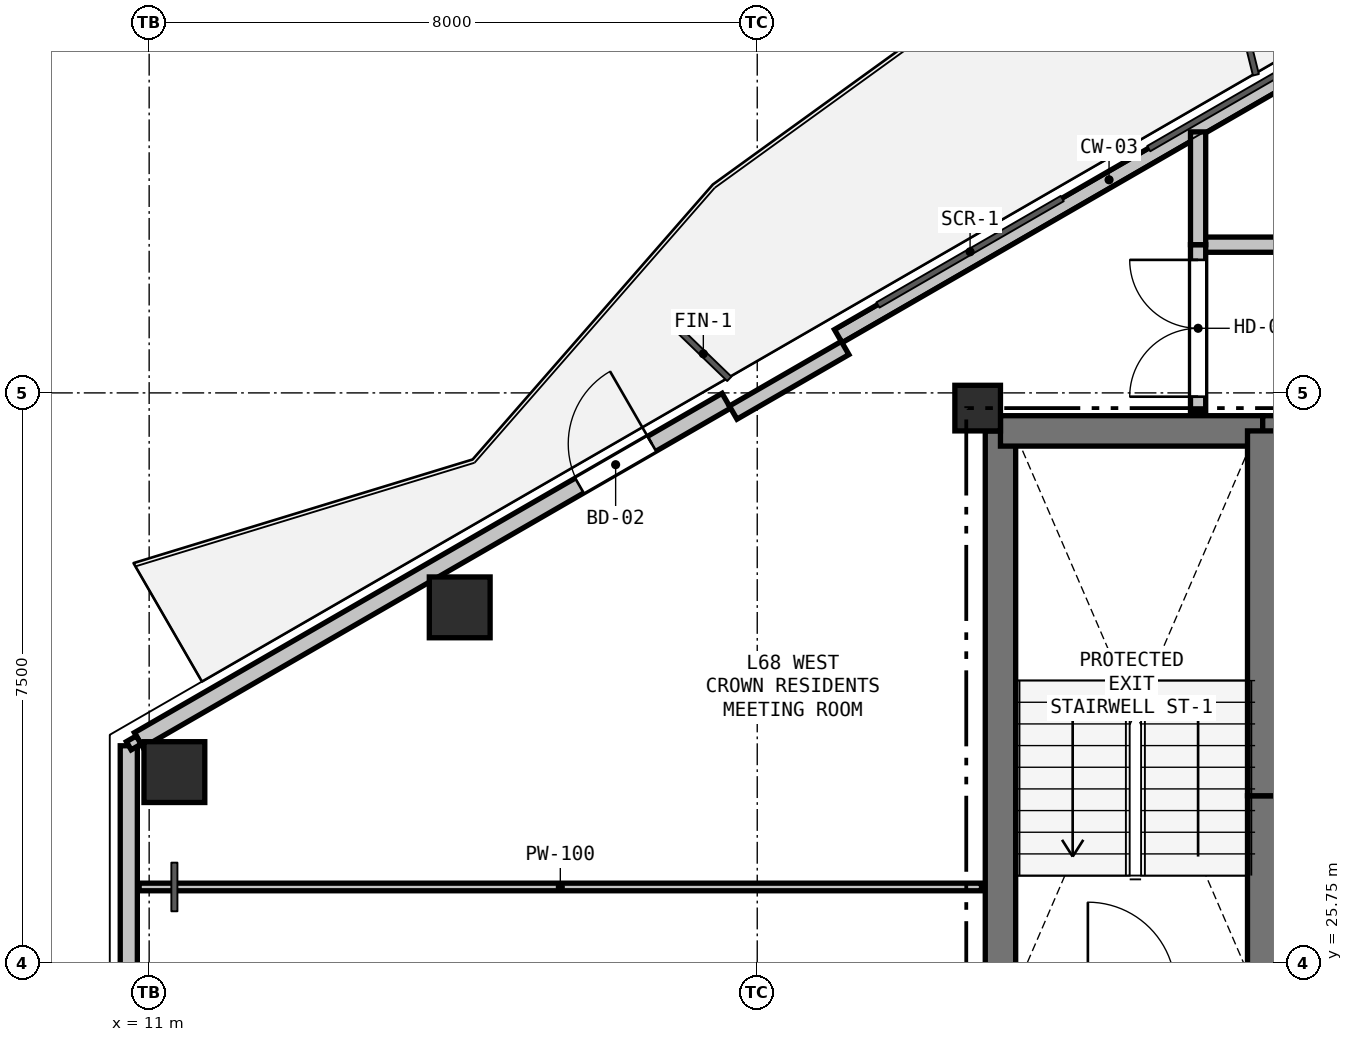
"""IFC4 building model, lengths in metres.
Left out: names, types, materials, properties, quantities, classifications, styles, units other than length and angle.
Written with IfcOpenShell. Run it as: python <this file> out.ifc"""

import sys

from ifc_helpers import new_model, si_unit, direction, frame, frame_2d, origin, origin_2d, place, context, subcontext, project, spatial, rectangle, hollow_rectangle, extrude, element, fill, save


model = new_model("IFC4")
c1 = context("Model", 3, precision=1e-05, world=origin(), true_north=direction((0.0, 1.0)))
c2 = subcontext(c1, "Body", "Model", "MODEL_VIEW")
j1 = project(units=[si_unit("LENGTHUNIT", "METRE"), si_unit("PLANEANGLEUNIT", "RADIAN")], contexts=[c1])
p1 = place(None, origin())
s1 = spatial("IfcSite", under=j1, at=p1, CompositionType="ELEMENT")
p2 = place(p1, origin())
s2 = spatial("IfcBuilding", under=s1, at=p2, CompositionType="ELEMENT")
p3 = place(p2, frame((0.0, 0.0, 243.0)))
s3 = spatial("IfcBuildingStorey", under=s2, at=p3, CompositionType="ELEMENT", Elevation=243.0)
p4 = place(p3, frame((21.9, 33.05, 0.0), z_axis=(0.0, 0.0, 1.0), x_axis=(1.0, 0.0, 0.0)))
e1 = element("IfcColumn", 1, at=p4, inside=s3, PredefinedType="COLUMN", context=c2, shape_type="SweptSolid", body=[
    extrude(rectangle(XDim=0.6, YDim=0.6, at=origin_2d()), origin(), (0.0, 0.0, 1.0), 3.3),
])
for number, where, z_axis, x_axis in (
    (2, (11.332, 28.261, 0.0), (0.0, 0.0, 1.0), (1.0, 0.0, 0.0)),
    (3, (15.086, 30.428, 0.0), (0.0, 0.0, 1.0), (1.0, 0.0, 0.0)),
):
    element("IfcColumn", number, at=place(p3, frame(where, z_axis=z_axis, x_axis=x_axis)), inside=s3, PredefinedType="COLUMN", context=c2, shape_type="SweptSolid", body=[
        extrude(hollow_rectangle(XDim=0.8, YDim=0.8, WallThickness=0.025, at=origin_2d()), origin(), (0.0, 0.0, 1.0), 3.3),
    ])
p5 = place(p3, frame((10.732, 24.892, 0.0), z_axis=(0.0, 0.0, 1.0), x_axis=(0.0, 1.0, 0.0)))
e4 = element("IfcWall", 4, at=p5, inside=s3, PredefinedType="SOLIDWALL", context=c2, shape_type="SweptSolid", body=[
    extrude(rectangle(XDim=3.715, YDim=0.225, at=frame_2d((1.858, 0.0))), origin(), (0.0, 0.0, 1.0), 2.7),
])
p6 = place(p3, frame((10.862, 28.683, 0.0), z_axis=(0.0, 0.0, 1.0), x_axis=(0.866026655105, 0.499997832642, 0.0)))
e5 = element("IfcWall", 5, at=p6, inside=s3, PredefinedType="SOLIDWALL", context=c2, shape_type="SweptSolid", body=[
    extrude(rectangle(XDim=8.928, YDim=0.225, at=frame_2d((4.464, 0.0))), origin(), (0.0, 0.0, 1.0), 2.7),
])
p7 = place(p6, frame((6.696, 0.0, 0.0)))
e6 = element("IfcOpeningElement", 6, at=p7, cuts=e5, PredefinedType="OPENING", context=c2, shape_type="SweptSolid", body=[
    extrude(rectangle(XDim=1.1, YDim=2.1, at=frame_2d((0.55, 1.05))), frame((0.0, 0.123, 0.0), z_axis=(0.0, -1.0, 0.0), x_axis=(1.0, 0.0, 0.0)), (0.0, 0.0, 1.0), 0.245),
])
p8 = place(p3, frame((20.066, 33.997, 0.0), z_axis=(0.0, 0.0, 1.0), x_axis=(0.866019557082, 0.500010126649, 0.0)))
e7 = element("IfcWall", 7, at=p8, inside=s3, PredefinedType="PARAPET", context=c2, shape_type="SweptSolid", body=[
    extrude(rectangle(XDim=8.228, YDim=0.2, at=frame_2d((4.114, 0.0))), origin(), (0.0, 0.0, 1.0), 0.2),
])
p9 = place(p3, frame((18.684, 32.991, 0.0), z_axis=(0.0, 0.0, 1.0), x_axis=(0.866025371046, 0.500000056704, 0.0)))
e8 = element("IfcWall", 8, at=p9, inside=s3, PredefinedType="PARAPET", context=c2, shape_type="SweptSolid", body=[
    extrude(rectangle(XDim=1.7, YDim=0.2, at=frame_2d((0.85, 0.0))), origin(), (0.0, 0.0, 1.0), 2.7),
])
p10 = place(p3, frame((22.2, 25.4, 0.0), z_axis=(0.0, 0.0, 1.0), x_axis=(0.0, 1.0, 0.0)))
e9 = element("IfcWall", 9, at=p10, inside=s3, PredefinedType="SHEAR", context=c2, shape_type="SweptSolid", body=[
    extrude(rectangle(XDim=7.35, YDim=0.4, at=frame_2d((3.675, 0.0))), origin(), (0.0, 0.0, 1.0), 3.08),
])
p11 = place(p3, frame((22.2, 32.75, 0.0), z_axis=(0.0, 0.0, 1.0), x_axis=(1.0, 0.0, 0.0)))
e10 = element("IfcWall", 10, at=p11, inside=s3, PredefinedType="SHEAR", context=c2, shape_type="SweptSolid", body=[
    extrude(rectangle(XDim=3.45, YDim=0.4, at=frame_2d((1.725, 0.0))), origin(), (0.0, 0.0, 1.0), 3.08),
])
p12 = place(p3, frame((25.65, 32.75, 0.0), z_axis=(0.0, 0.0, 1.0), x_axis=(1.0, 0.0, 0.0)))
e11 = element("IfcWall", 11, at=p12, inside=s3, PredefinedType="SHEAR", context=c2, shape_type="SweptSolid", body=[
    extrude(rectangle(XDim=1.75, YDim=0.4, at=frame_2d((0.875, 0.0))), origin(), (0.0, 0.0, 1.0), 3.08),
])
p13 = place(p12, frame((0.375, 0.0, 0.0)))
e12 = element("IfcOpeningElement", 12, at=p13, cuts=e11, PredefinedType="OPENING", context=c2, shape_type="SweptSolid", body=[
    extrude(rectangle(XDim=1.0, YDim=2.15, at=frame_2d((0.5, 1.075))), frame((0.0, 0.21, 0.0), z_axis=(0.0, -1.0, 0.0), x_axis=(1.0, 0.0, 0.0)), (0.0, 0.0, 1.0), 0.42),
])
p14 = place(p3, frame((25.65, 25.55, 0.0), z_axis=(0.0, 0.0, 1.0), x_axis=(0.0, 1.0, 0.0)))
e13 = element("IfcWall", 13, at=p14, inside=s3, PredefinedType="SHEAR", context=c2, shape_type="SweptSolid", body=[
    extrude(rectangle(XDim=2.4, YDim=0.4, at=frame_2d((1.2, 0.0))), origin(), (0.0, 0.0, 1.0), 3.08),
])
p15 = place(p3, frame((25.65, 27.95, 0.0), z_axis=(0.0, 0.0, 1.0), x_axis=(0.0, 1.0, 0.0)))
e14 = element("IfcWall", 14, at=p15, inside=s3, PredefinedType="SHEAR", context=c2, shape_type="SweptSolid", body=[
    extrude(rectangle(XDim=4.8, YDim=0.4, at=frame_2d((2.4, 0.0))), origin(), (0.0, 0.0, 1.0), 3.08),
])
p16 = place(p3, frame((24.8, 35.2, 0.0), z_axis=(0.0, 0.0, 1.0), x_axis=(1.0, 0.0, 0.0)))
e15 = element("IfcWall", 15, at=p16, inside=s3, PredefinedType="PARTITIONING", context=c2, shape_type="SweptSolid", body=[
    extrude(rectangle(XDim=2.0, YDim=0.2, at=frame_2d((1.0, 0.0))), origin(), (0.0, 0.0, 1.0), 3.08),
])
p17 = place(p3, frame((24.8, 33.0, 0.0), z_axis=(0.0, 0.0, 1.0), x_axis=(0.0, 1.0, 0.0)))
e16 = element("IfcWall", 16, at=p17, inside=s3, PredefinedType="PARTITIONING", context=c2, shape_type="SweptSolid", body=[
    extrude(rectangle(XDim=2.2, YDim=0.2, at=frame_2d((1.1, 0.0))), origin(), (0.0, 0.0, 1.0), 2.605),
])
p18 = place(p17, frame((0.2, 0.0, 0.0)))
e17 = element("IfcOpeningElement", 17, at=p18, cuts=e16, PredefinedType="OPENING", context=c2, shape_type="SweptSolid", body=[
    extrude(rectangle(XDim=1.8, YDim=2.2, at=frame_2d((0.9, 1.1))), frame((0.0, 0.11, 0.0), z_axis=(0.0, -1.0, 0.0), x_axis=(1.0, 0.0, 0.0)), (0.0, 0.0, 1.0), 0.22),
])
p19 = place(p3, frame((24.8, 35.2, 0.0), z_axis=(0.0, 0.0, 1.0), x_axis=(0.0, 1.0, 0.0)))
e18 = element("IfcWall", 18, at=p19, inside=s3, PredefinedType="PARTITIONING", context=c2, shape_type="SweptSolid", body=[
    extrude(rectangle(XDim=1.484, YDim=0.2, at=frame_2d((0.742, 0.0))), origin(), (0.0, 0.0, 1.0), 2.365),
])
p20 = place(p3, frame((21.95, 26.75, 0.0), z_axis=(0.0, 0.0, 1.0), x_axis=(-1.0, 0.0, 0.0)))
e19 = element("IfcWall", 19, at=p20, inside=s3, PredefinedType="PARTITIONING", context=c2, shape_type="SweptSolid", body=[
    extrude(rectangle(XDim=11.082, YDim=0.1, at=frame_2d((5.541, 0.0))), origin(), (0.0, 0.0, 1.0), 2.605),
])
p21 = place(p3, frame((10.732, 28.608, 0.0), z_axis=(0.0, 0.0, 1.0), x_axis=(0.866131372301, 0.499816412211, 0.0)))
e20 = element("IfcWall", 20, at=p21, inside=s3, PredefinedType="PARTITIONING", context=c2, shape_type="SweptSolid", body=[
    extrude(rectangle(XDim=0.15, YDim=0.125, at=frame_2d((0.075, 0.0))), origin(), (0.0, 0.0, 1.0), 3.08),
])
p22 = place(p7, origin())
e21 = element("IfcDoor", 21, at=p22, inside=s3, OperationType="SINGLE_SWING_RIGHT", PredefinedType="DOOR", context=c2, shape_type="SweptSolid", body=[
    extrude(rectangle(XDim=1.1, YDim=2.1, at=frame_2d((0.55, 1.05))), frame((0.0, 0.025, 0.0), z_axis=(0.0, -1.0, 0.0), x_axis=(1.0, 0.0, 0.0)), (0.0, 0.0, 1.0), 0.05),
])
fill(e6, e21)
p23 = place(p18, origin())
e22 = element("IfcDoor", 22, at=p23, inside=s3, OperationType="DOUBLE_DOOR_SINGLE_SWING", PredefinedType="DOOR", context=c2, shape_type="SweptSolid", body=[
    extrude(rectangle(XDim=1.8, YDim=2.2, at=frame_2d((0.9, 1.1))), frame((0.0, 0.025, 0.0), z_axis=(0.0, -1.0, 0.0), x_axis=(1.0, 0.0, 0.0)), (0.0, 0.0, 1.0), 0.05),
])
fill(e17, e22)
save(model, sys.argv[1])
